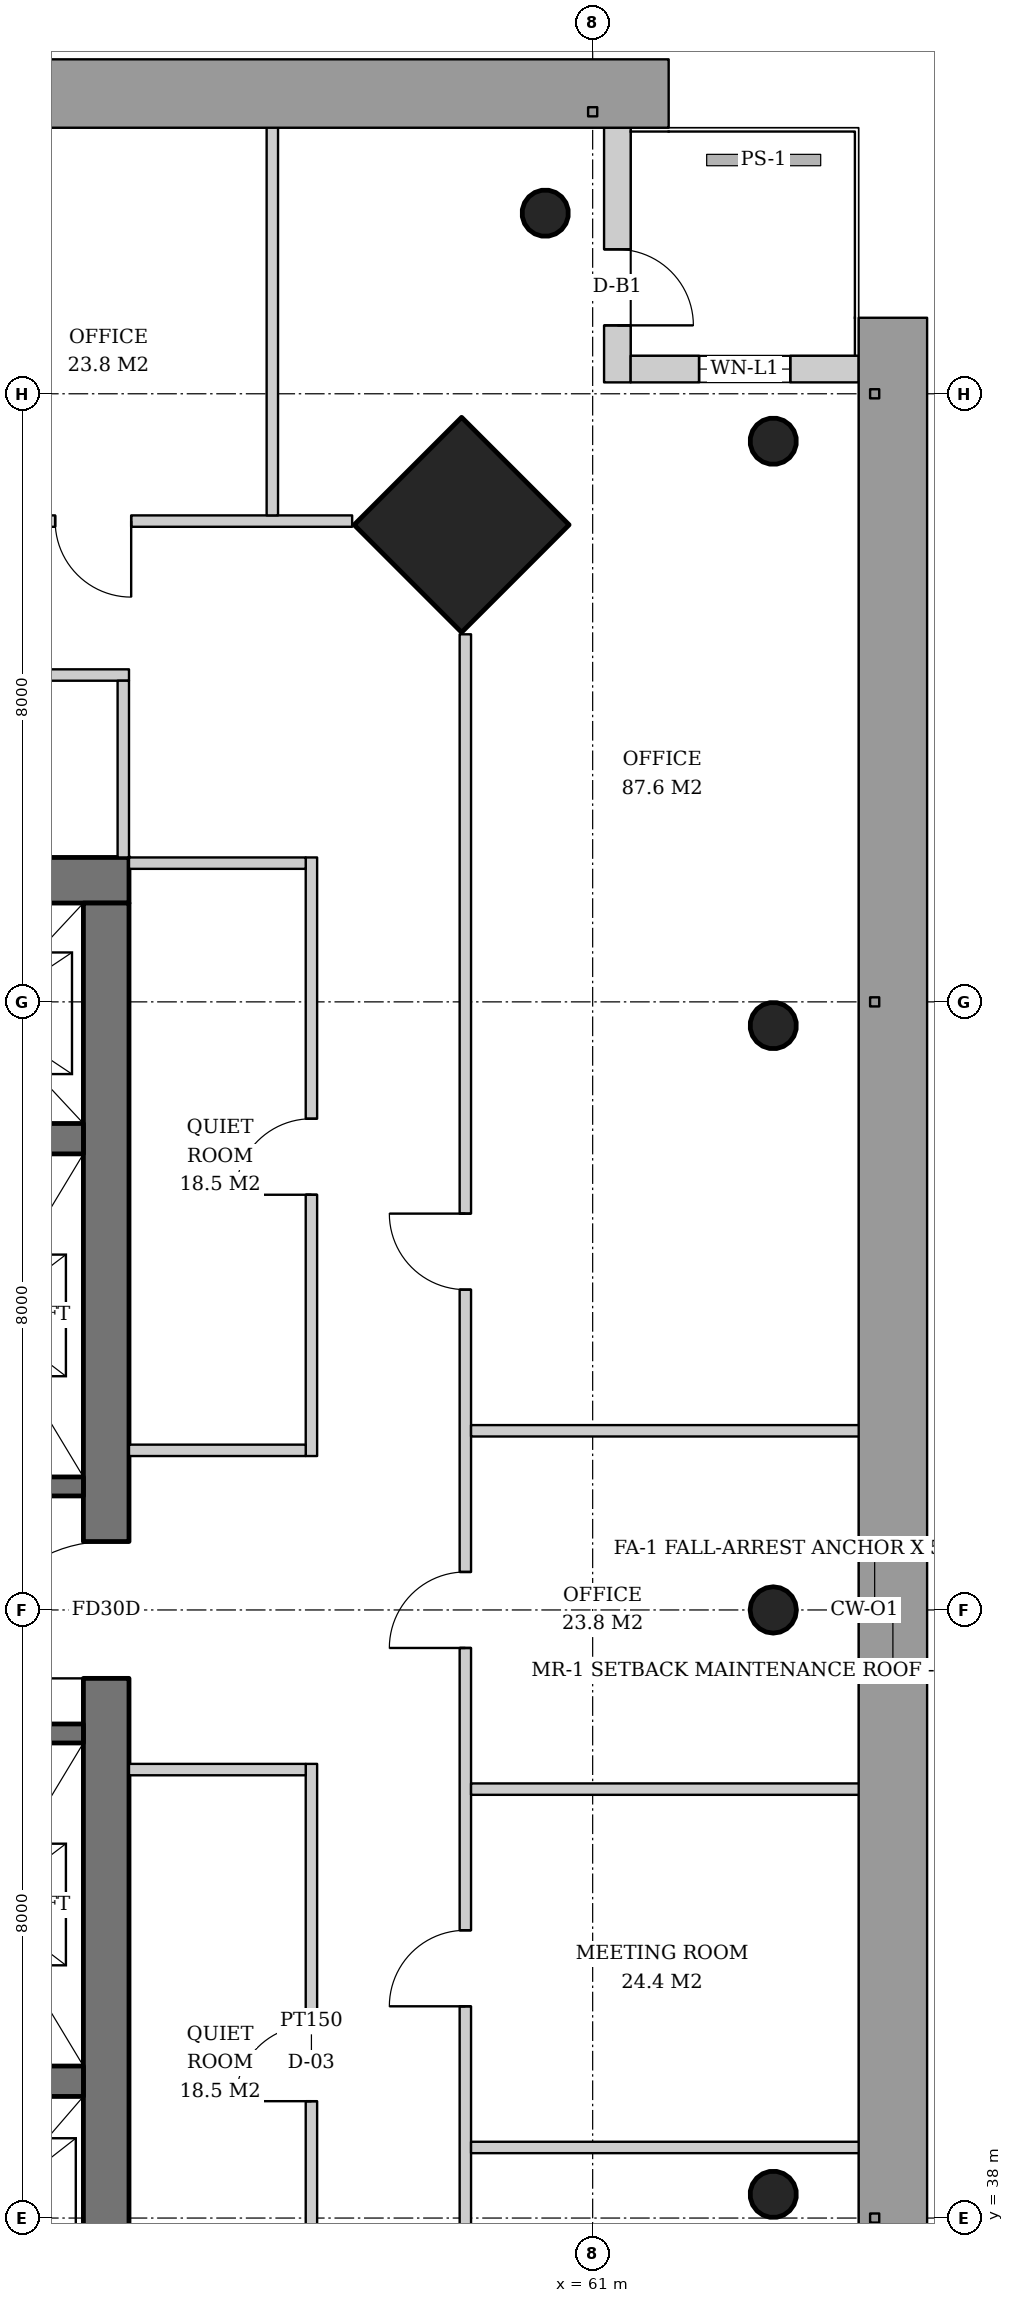
"""IFC4 building model, lengths in metres.
Left out: names, types, materials, properties, quantities, classifications, styles, units other than length and angle.
Written with IfcOpenShell. Run it as: python <this file> out.ifc"""

import sys

from ifc_helpers import new_model, si_unit, direction, frame, frame_2d, origin, origin_2d, place, context, subcontext, project, spatial, rectangle, hollow_circle, extrude, element, fill, save


model = new_model("IFC4")
c1 = context("Model", 3, precision=1e-05, world=origin(), true_north=direction((0.0, 1.0)))
c2 = subcontext(c1, "Body", "Model", "MODEL_VIEW")
j1 = project(units=[si_unit("LENGTHUNIT", "METRE"), si_unit("PLANEANGLEUNIT", "RADIAN")], contexts=[c1])
p1 = place(None, origin())
s1 = spatial("IfcSite", under=j1, at=p1, CompositionType="ELEMENT")
p2 = place(p1, origin())
s2 = spatial("IfcBuilding", under=s1, at=p2, CompositionType="ELEMENT")
p3 = place(p2, frame((0.0, 0.0, 195.8)))
s3 = spatial("IfcBuildingStorey", under=s2, at=p3, CompositionType="ELEMENT", Elevation=195.8)
p4 = place(p3, frame((59.314, 60.314, 0.0), z_axis=(-0.031898107953, -0.031898107953, 0.998981992539), x_axis=(0.707106781187, -0.707106781187, 0.0)))
e1 = element("IfcColumn", 1, at=p4, inside=s3, PredefinedType="COLUMN", context=c2, shape_type="SweptSolid", body=[
    extrude(rectangle(XDim=2.0, YDim=2.0, at=origin_2d()), origin(), (0.0, 0.0, 1.0), 3.804),
])
p5 = place(p3, frame((63.414, 61.414, 0.0), z_axis=(-0.031898107953, -0.031898107953, 0.998981992539), x_axis=(0.707106781187, -0.707106781187, 0.0)))
e2 = element("IfcColumn", 2, at=p5, inside=s3, PredefinedType="COLUMN", context=c2, shape_type="SweptSolid", body=[
    extrude(hollow_circle(Radius=0.305, WallThickness=0.025, at=origin_2d()), origin(), (0.0, 0.0, 1.0), 3.804),
])
p6 = place(p3, frame((63.414, 38.293, 0.0), z_axis=(-0.031910302246, 0.015923048203, 0.999363892257), x_axis=(-0.446493300058, -0.894786976326, 0.0)))
e3 = element("IfcColumn", 3, at=p6, inside=s3, PredefinedType="COLUMN", context=c2, shape_type="SweptSolid", body=[
    extrude(hollow_circle(Radius=0.305, WallThickness=0.025, at=origin_2d()), origin(), (0.0, 0.0, 1.0), 3.802),
])
p7 = place(p3, frame((63.414, 46.0, 0.0), z_axis=(-0.031914348339, 0.0, 0.999490607445), x_axis=(0.0, -1.0, 0.0)))
e4 = element("IfcColumn", 4, at=p7, inside=s3, PredefinedType="COLUMN", context=c2, shape_type="SweptSolid", body=[
    extrude(hollow_circle(Radius=0.305, WallThickness=0.025, at=origin_2d()), origin(), (0.0, 0.0, 1.0), 3.802),
])
p8 = place(p3, frame((63.414, 53.707, 0.0), z_axis=(-0.031910302246, -0.015923048203, 0.999363892257), x_axis=(0.446493300058, -0.894786976326, 0.0)))
e5 = element("IfcColumn", 5, at=p8, inside=s3, PredefinedType="COLUMN", context=c2, shape_type="SweptSolid", body=[
    extrude(hollow_circle(Radius=0.305, WallThickness=0.025, at=origin_2d()), origin(), (0.0, 0.0, 1.0), 3.802),
])
p9 = place(p3, frame((60.414, 64.414, 0.0), z_axis=(-0.031898107953, -0.031898107953, 0.998981992539), x_axis=(0.707106781187, -0.707106781187, 0.0)))
e6 = element("IfcColumn", 6, at=p9, inside=s3, PredefinedType="COLUMN", context=c2, shape_type="SweptSolid", body=[
    extrude(hollow_circle(Radius=0.305, WallThickness=0.025, at=origin_2d()), origin(), (0.0, 0.0, 1.0), 3.804),
])
p10 = place(p3, frame((35.1, 55.6, 0.0), z_axis=(0.0, 0.0, 1.0), x_axis=(1.0, 0.0, 0.0)))
e7 = element("IfcWall", 7, at=p10, inside=s3, PredefinedType="SHEAR", context=c2, shape_type="SweptSolid", body=[
    extrude(rectangle(XDim=19.8, YDim=0.6, at=frame_2d((9.9, 0.0))), origin(), (0.0, 0.0, 1.0), 3.8),
])
p11 = place(p10, frame((14.54, 0.0, 0.0)))
e8 = element("IfcOpeningElement", 8, at=p11, cuts=e7, PredefinedType="OPENING", context=c2, shape_type="SweptSolid", body=[
    extrude(rectangle(XDim=1.0, YDim=2.1, at=frame_2d((0.5, 1.05))), frame((0.0, 0.31, 0.0), z_axis=(0.0, -1.0, 0.0), x_axis=(1.0, 0.0, 0.0)), (0.0, 0.0, 1.0), 0.62),
])
p12 = place(p10, frame((0.85, 0.0, 0.0)))
e9 = element("IfcOpeningElement", 9, at=p12, cuts=e7, PredefinedType="OPENING", context=c2, shape_type="SweptSolid", body=[
    extrude(rectangle(XDim=1.0, YDim=2.1, at=frame_2d((0.5, 1.05))), frame((0.0, 0.31, 0.0), z_axis=(0.0, -1.0, 0.0), x_axis=(1.0, 0.0, 0.0)), (0.0, 0.0, 1.0), 0.62),
])
p13 = place(p10, frame((2.338, 0.0, 0.0)))
e10 = element("IfcOpeningElement", 10, at=p13, cuts=e7, PredefinedType="OPENING", context=c2, shape_type="SweptSolid", body=[
    extrude(rectangle(XDim=1.0, YDim=2.1, at=frame_2d((0.5, 1.05))), frame((0.0, 0.31, 0.0), z_axis=(0.0, -1.0, 0.0), x_axis=(1.0, 0.0, 0.0)), (0.0, 0.0, 1.0), 0.62),
])
p14 = place(p10, frame((3.913, 0.0, 0.0)))
e11 = element("IfcOpeningElement", 11, at=p14, cuts=e7, PredefinedType="OPENING", context=c2, shape_type="SweptSolid", body=[
    extrude(rectangle(XDim=1.0, YDim=2.1, at=frame_2d((0.5, 1.05))), frame((0.0, 0.31, 0.0), z_axis=(0.0, -1.0, 0.0), x_axis=(1.0, 0.0, 0.0)), (0.0, 0.0, 1.0), 0.62),
])
p15 = place(p3, frame((54.6, 36.7, 0.0), z_axis=(0.0, 0.0, 1.0), x_axis=(0.0, 1.0, 0.0)))
e12 = element("IfcWall", 12, at=p15, inside=s3, PredefinedType="SHEAR", context=c2, shape_type="SweptSolid", body=[
    extrude(rectangle(XDim=18.6, YDim=0.6, at=frame_2d((9.3, 0.0))), origin(), (0.0, 0.0, 1.0), 3.8),
])
p16 = place(p15, frame((8.4, 0.0, 0.0)))
e13 = element("IfcOpeningElement", 13, at=p16, cuts=e12, PredefinedType="OPENING", context=c2, shape_type="SweptSolid", body=[
    extrude(rectangle(XDim=1.8, YDim=2.4, at=frame_2d((0.9, 1.2))), frame((0.0, 0.31, 0.0), z_axis=(0.0, -1.0, 0.0), x_axis=(1.0, 0.0, 0.0)), (0.0, 0.0, 1.0), 0.62),
])
for number, where, z_axis, x_axis in (
    (14, (35.7, 39.8, 0.0), (0.0, 0.0, 1.0), (1.0, 0.0, 0.0)),
    (15, (35.7, 52.2, 0.0), (0.0, 0.0, 1.0), (1.0, 0.0, 0.0)),
):
    element("IfcWall", number, at=place(p3, frame(where, z_axis=z_axis, x_axis=x_axis)), inside=s3, PredefinedType="SHEAR", context=c2, shape_type="SweptSolid", body=[
        extrude(rectangle(XDim=18.6, YDim=0.4, at=frame_2d((9.3, 0.0))), origin(), (0.0, 0.0, 1.0), 3.8),
    ])
p17 = place(p3, frame((61.325, 65.5, 0.0), z_axis=(0.0, 0.0, 1.0), x_axis=(0.0, -1.0, 0.0)))
e16 = element("IfcWall", 16, at=p17, inside=s3, PredefinedType="SOLIDWALL", context=c2, shape_type="SweptSolid", body=[
    extrude(rectangle(XDim=3.35, YDim=0.35, at=frame_2d((1.675, 0.0))), origin(), (0.0, 0.0, 1.0), 3.62),
])
p18 = place(p17, frame((1.6, 0.0, 0.0)))
e17 = element("IfcOpeningElement", 17, at=p18, cuts=e16, PredefinedType="OPENING", context=c2, shape_type="SweptSolid", body=[
    extrude(rectangle(XDim=1.0, YDim=2.4, at=frame_2d((0.5, 1.2))), frame((0.0, 0.185, 0.0), z_axis=(0.0, -1.0, 0.0), x_axis=(1.0, 0.0, 0.0)), (0.0, 0.0, 1.0), 0.37),
])
p19 = place(p3, frame((61.5, 62.325, 0.0), z_axis=(0.0, 0.0, 1.0), x_axis=(1.0, 0.0, 0.0)))
e18 = element("IfcWall", 18, at=p19, inside=s3, PredefinedType="SOLIDWALL", context=c2, shape_type="SweptSolid", body=[
    extrude(rectangle(XDim=3.0, YDim=0.35, at=frame_2d((1.5, 0.0))), origin(), (0.0, 0.0, 1.0), 3.62),
])
p20 = place(p19, frame((0.9, 0.0, 0.6)))
e19 = element("IfcOpeningElement", 19, at=p20, cuts=e18, PredefinedType="OPENING", context=c2, shape_type="SweptSolid", body=[
    extrude(rectangle(XDim=1.2, YDim=2.55, at=frame_2d((0.6, 1.275))), frame((0.0, 0.185, 0.0), z_axis=(0.0, -1.0, 0.0), x_axis=(1.0, 0.0, 0.0)), (0.0, 0.0, 1.0), 0.37),
])
for number, where, z_axis, x_axis in (
    (20, (48.93, 47.625, 0.0), (0.0, 0.0, 1.0), (1.0, 0.0, 0.0)),
    (21, (48.93, 44.375, 0.0), (0.0, 0.0, 1.0), (1.0, 0.0, 0.0)),
):
    element("IfcWall", number, at=place(p3, frame(where, z_axis=z_axis, x_axis=x_axis)), inside=s3, PredefinedType="SHEAR", context=c2, shape_type="SweptSolid", body=[
        extrude(rectangle(XDim=5.37, YDim=0.25, at=frame_2d((2.685, 0.0))), origin(), (0.0, 0.0, 1.0), 3.8),
    ])
p21 = place(p3, frame((57.3, 36.1, 0.0), z_axis=(0.0, 0.0, 1.0), x_axis=(0.0, 1.0, 0.0)))
e22 = element("IfcWall", 22, at=p21, inside=s3, PredefinedType="PARTITIONING", context=c2, shape_type="SweptSolid", body=[
    extrude(rectangle(XDim=7.875, YDim=0.15, at=frame_2d((3.938, 0.0))), origin(), (0.0, 0.0, 1.0), 2.867),
])
p22 = place(p21, frame((3.438, 0.0, 0.0)))
e23 = element("IfcOpeningElement", 23, at=p22, cuts=e22, PredefinedType="OPENING", context=c2, shape_type="SweptSolid", body=[
    extrude(rectangle(XDim=1.0, YDim=2.1, at=frame_2d((0.5, 1.05))), frame((0.0, 0.085, 0.0), z_axis=(0.0, -1.0, 0.0), x_axis=(1.0, 0.0, 0.0)), (0.0, 0.0, 1.0), 0.17),
])
p23 = place(p3, frame((54.9, 43.9, 0.0), z_axis=(0.0, 0.0, 1.0), x_axis=(1.0, 0.0, 0.0)))
e24 = element("IfcWall", 24, at=p23, inside=s3, PredefinedType="PARTITIONING", context=c2, shape_type="SweptSolid", body=[
    extrude(rectangle(XDim=2.325, YDim=0.15, at=frame_2d((1.163, 0.0))), origin(), (0.0, 0.0, 1.0), 3.62),
])
p24 = place(p3, frame((57.3, 48.025, 0.0), z_axis=(0.0, 0.0, 1.0), x_axis=(0.0, 1.0, 0.0)))
e25 = element("IfcWall", 25, at=p24, inside=s3, PredefinedType="PARTITIONING", context=c2, shape_type="SweptSolid", body=[
    extrude(rectangle(XDim=7.875, YDim=0.15, at=frame_2d((3.938, 0.0))), origin(), (0.0, 0.0, 1.0), 2.867),
])
p25 = place(p24, frame((3.438, 0.0, 0.0)))
e26 = element("IfcOpeningElement", 26, at=p25, cuts=e25, PredefinedType="OPENING", context=c2, shape_type="SweptSolid", body=[
    extrude(rectangle(XDim=1.0, YDim=2.1, at=frame_2d((0.5, 1.05))), frame((0.0, 0.085, 0.0), z_axis=(0.0, -1.0, 0.0), x_axis=(1.0, 0.0, 0.0)), (0.0, 0.0, 1.0), 0.17),
])
for number, where, z_axis, x_axis in (
    (27, (54.9, 48.1, 0.0), (0.0, 0.0, 1.0), (1.0, 0.0, 0.0)),
    (28, (54.9, 55.825, 0.0), (0.0, 0.0, 1.0), (1.0, 0.0, 0.0)),
):
    element("IfcWall", number, at=place(p3, frame(where, z_axis=z_axis, x_axis=x_axis)), inside=s3, PredefinedType="PARTITIONING", context=c2, shape_type="SweptSolid", body=[
        extrude(rectangle(XDim=2.325, YDim=0.15, at=frame_2d((1.163, 0.0))), origin(), (0.0, 0.0, 1.0), 3.62),
    ])
p26 = place(p3, frame((54.9, 58.3, 0.0), z_axis=(0.0, 0.0, 1.0), x_axis=(-1.0, 0.0, 0.0)))
e29 = element("IfcWall", 29, at=p26, inside=s3, PredefinedType="PARTITIONING", context=c2, shape_type="SweptSolid", body=[
    extrude(rectangle(XDim=3.135, YDim=0.15, at=frame_2d((1.567, 0.0))), origin(), (0.0, 0.0, 1.0), 2.92),
])
p27 = place(p26, frame((1.067, 0.0, 0.0)))
e30 = element("IfcOpeningElement", 30, at=p27, cuts=e29, PredefinedType="OPENING", context=c2, shape_type="SweptSolid", body=[
    extrude(rectangle(XDim=1.0, YDim=2.1, at=frame_2d((0.5, 1.05))), frame((0.0, 0.085, 0.0), z_axis=(0.0, -1.0, 0.0), x_axis=(1.0, 0.0, 0.0)), (0.0, 0.0, 1.0), 0.17),
])
p28 = place(p3, frame((54.825, 55.9, 0.0), z_axis=(0.0, 0.0, 1.0), x_axis=(0.0, 1.0, 0.0)))
e31 = element("IfcWall", 31, at=p28, inside=s3, PredefinedType="PARTITIONING", context=c2, shape_type="SweptSolid", body=[
    extrude(rectangle(XDim=2.325, YDim=0.15, at=frame_2d((1.163, 0.0))), origin(), (0.0, 0.0, 1.0), 2.867),
])
p29 = place(p3, frame((59.325, 33.164, 0.0), z_axis=(0.0, 0.0, 1.0), x_axis=(0.0, 1.0, 0.0)))
e32 = element("IfcWall", 32, at=p29, inside=s3, PredefinedType="PARTITIONING", context=c2, shape_type="SweptSolid", body=[
    extrude(rectangle(XDim=25.671, YDim=0.15, at=frame_2d((12.836, 0.0))), origin(), (0.0, 0.0, 1.0), 2.867),
])
p30 = place(p29, frame((2.907, 0.0, 0.0)))
e33 = element("IfcOpeningElement", 33, at=p30, cuts=e32, PredefinedType="OPENING", context=c2, shape_type="SweptSolid", body=[
    extrude(rectangle(XDim=1.0, YDim=2.1, at=frame_2d((0.5, 1.05))), frame((0.0, 0.085, 0.0), z_axis=(0.0, -1.0, 0.0), x_axis=(1.0, 0.0, 0.0)), (0.0, 0.0, 1.0), 0.17),
])
p31 = place(p29, frame((7.622, 0.0, 0.0)))
e34 = element("IfcOpeningElement", 34, at=p31, cuts=e32, PredefinedType="OPENING", context=c2, shape_type="SweptSolid", body=[
    extrude(rectangle(XDim=1.0, YDim=2.1, at=frame_2d((0.5, 1.05))), frame((0.0, 0.085, 0.0), z_axis=(0.0, -1.0, 0.0), x_axis=(1.0, 0.0, 0.0)), (0.0, 0.0, 1.0), 0.17),
])
p32 = place(p29, frame((12.336, 0.0, 0.0)))
e35 = element("IfcOpeningElement", 35, at=p32, cuts=e32, PredefinedType="OPENING", context=c2, shape_type="SweptSolid", body=[
    extrude(rectangle(XDim=1.0, YDim=2.1, at=frame_2d((0.5, 1.05))), frame((0.0, 0.085, 0.0), z_axis=(0.0, -1.0, 0.0), x_axis=(1.0, 0.0, 0.0)), (0.0, 0.0, 1.0), 0.17),
])
p33 = place(p29, frame((17.05, 0.0, 0.0)))
e36 = element("IfcOpeningElement", 36, at=p33, cuts=e32, PredefinedType="OPENING", context=c2, shape_type="SweptSolid", body=[
    extrude(rectangle(XDim=1.0, YDim=2.1, at=frame_2d((0.5, 1.05))), frame((0.0, 0.085, 0.0), z_axis=(0.0, -1.0, 0.0), x_axis=(1.0, 0.0, 0.0)), (0.0, 0.0, 1.0), 0.17),
])
for number, where, z_axis, x_axis in (
    (37, (59.4, 38.928, 0.0), (0.0, 0.0, 1.0), (1.0, 0.0, 0.0)),
    (38, (59.4, 43.643, 0.0), (0.0, 0.0, 1.0), (1.0, 0.0, 0.0)),
):
    element("IfcWall", number, at=place(p3, frame(where, z_axis=z_axis, x_axis=x_axis)), inside=s3, PredefinedType="PARTITIONING", context=c2, shape_type="SweptSolid", body=[
        extrude(rectangle(XDim=5.14, YDim=0.15, at=frame_2d((2.57, 0.0))), origin(), (0.0, 0.0, 1.0), 3.12),
    ])
p34 = place(p3, frame((59.4, 48.357, 0.0), z_axis=(0.0, 0.0, 1.0), x_axis=(1.0, 0.0, 0.0)))
e39 = element("IfcWall", 39, at=p34, inside=s3, PredefinedType="PARTITIONING", context=c2, shape_type="SweptSolid", body=[
    extrude(rectangle(XDim=5.14, YDim=0.15, at=frame_2d((2.57, 0.0))), origin(), (0.0, 0.0, 1.0), 2.867),
])
p35 = place(p3, frame((57.836, 60.325, 0.0), z_axis=(0.0, 0.0, 1.0), x_axis=(-1.0, 0.0, 0.0)))
e40 = element("IfcWall", 40, at=p35, inside=s3, PredefinedType="PARTITIONING", context=c2, shape_type="SweptSolid", body=[
    extrude(rectangle(XDim=25.671, YDim=0.15, at=frame_2d((12.836, 0.0))), origin(), (0.0, 0.0, 1.0), 2.867),
])
p36 = place(p35, frame((2.907, 0.0, 0.0)))
e41 = element("IfcOpeningElement", 41, at=p36, cuts=e40, PredefinedType="OPENING", context=c2, shape_type="SweptSolid", body=[
    extrude(rectangle(XDim=1.0, YDim=2.1, at=frame_2d((0.5, 1.05))), frame((0.0, 0.085, 0.0), z_axis=(0.0, -1.0, 0.0), x_axis=(1.0, 0.0, 0.0)), (0.0, 0.0, 1.0), 0.17),
])
p37 = place(p35, frame((7.622, 0.0, 0.0)))
e42 = element("IfcOpeningElement", 42, at=p37, cuts=e40, PredefinedType="OPENING", context=c2, shape_type="SweptSolid", body=[
    extrude(rectangle(XDim=1.0, YDim=2.1, at=frame_2d((0.5, 1.05))), frame((0.0, 0.085, 0.0), z_axis=(0.0, -1.0, 0.0), x_axis=(1.0, 0.0, 0.0)), (0.0, 0.0, 1.0), 0.17),
])
p38 = place(p35, frame((12.336, 0.0, 0.0)))
e43 = element("IfcOpeningElement", 43, at=p38, cuts=e40, PredefinedType="OPENING", context=c2, shape_type="SweptSolid", body=[
    extrude(rectangle(XDim=1.0, YDim=2.1, at=frame_2d((0.5, 1.05))), frame((0.0, 0.085, 0.0), z_axis=(0.0, -1.0, 0.0), x_axis=(1.0, 0.0, 0.0)), (0.0, 0.0, 1.0), 0.17),
])
p39 = place(p35, frame((17.05, 0.0, 0.0)))
e44 = element("IfcOpeningElement", 44, at=p39, cuts=e40, PredefinedType="OPENING", context=c2, shape_type="SweptSolid", body=[
    extrude(rectangle(XDim=1.0, YDim=2.1, at=frame_2d((0.5, 1.05))), frame((0.0, 0.085, 0.0), z_axis=(0.0, -1.0, 0.0), x_axis=(1.0, 0.0, 0.0)), (0.0, 0.0, 1.0), 0.17),
])
p40 = place(p35, frame((21.764, 0.0, 0.0)))
e45 = element("IfcOpeningElement", 45, at=p40, cuts=e40, PredefinedType="OPENING", context=c2, shape_type="SweptSolid", body=[
    extrude(rectangle(XDim=1.0, YDim=2.1, at=frame_2d((0.5, 1.05))), frame((0.0, 0.085, 0.0), z_axis=(0.0, -1.0, 0.0), x_axis=(1.0, 0.0, 0.0)), (0.0, 0.0, 1.0), 0.17),
])
p41 = place(p3, frame((56.786, 60.4, 0.0), z_axis=(0.0, 0.0, 1.0), x_axis=(0.0, 1.0, 0.0)))
e46 = element("IfcWall", 46, at=p41, inside=s3, PredefinedType="PARTITIONING", context=c2, shape_type="SweptSolid", body=[
    extrude(rectangle(XDim=5.14, YDim=0.15, at=frame_2d((2.57, 0.0))), origin(), (0.0, 0.0, 1.0), 3.12),
])
p42 = place(p18, origin())
e47 = element("IfcDoor", 47, at=p42, inside=s3, OperationType="SINGLE_SWING_RIGHT", PredefinedType="DOOR", context=c2, shape_type="SweptSolid", body=[
    extrude(rectangle(XDim=1.0, YDim=2.4, at=frame_2d((0.5, 1.2))), frame((0.0, 0.025, 0.0), z_axis=(0.0, -1.0, 0.0), x_axis=(1.0, 0.0, 0.0)), (0.0, 0.0, 1.0), 0.05),
])
fill(e17, e47)
p43 = place(p20, origin())
e48 = element("IfcWindow", 48, at=p43, inside=s3, PartitioningType="SINGLE_PANEL", PredefinedType="WINDOW", context=c2, shape_type="SweptSolid", body=[
    extrude(rectangle(XDim=1.2, YDim=2.55, at=frame_2d((0.6, 1.275))), frame((0.0, 0.03, 0.0), z_axis=(0.0, -1.0, 0.0), x_axis=(1.0, 0.0, 0.0)), (0.0, 0.0, 1.0), 0.06),
])
fill(e19, e48)
p44 = place(p16, origin())
e49 = element("IfcDoor", 49, at=p44, inside=s3, OperationType="DOUBLE_DOOR_SINGLE_SWING", PredefinedType="DOOR", context=c2, shape_type="SweptSolid", body=[
    extrude(rectangle(XDim=1.8, YDim=2.4, at=frame_2d((0.9, 1.2))), frame((0.0, 0.025, 0.0), z_axis=(0.0, -1.0, 0.0), x_axis=(1.0, 0.0, 0.0)), (0.0, 0.0, 1.0), 0.05),
])
fill(e13, e49)
p45 = place(p22, origin())
e50 = element("IfcDoor", 50, at=p45, inside=s3, OperationType="SINGLE_SWING_LEFT", PredefinedType="DOOR", context=c2, shape_type="SweptSolid", body=[
    extrude(rectangle(XDim=1.0, YDim=2.1, at=frame_2d((0.5, 1.05))), frame((0.0, 0.025, 0.0), z_axis=(0.0, -1.0, 0.0), x_axis=(1.0, 0.0, 0.0)), (0.0, 0.0, 1.0), 0.05),
])
fill(e23, e50)
p46 = place(p25, origin())
e51 = element("IfcDoor", 51, at=p46, inside=s3, OperationType="SINGLE_SWING_LEFT", PredefinedType="DOOR", context=c2, shape_type="SweptSolid", body=[
    extrude(rectangle(XDim=1.0, YDim=2.1, at=frame_2d((0.5, 1.05))), frame((0.0, 0.025, 0.0), z_axis=(0.0, -1.0, 0.0), x_axis=(1.0, 0.0, 0.0)), (0.0, 0.0, 1.0), 0.05),
])
fill(e26, e51)
p47 = place(p31, origin())
e52 = element("IfcDoor", 52, at=p47, inside=s3, OperationType="SINGLE_SWING_LEFT", PredefinedType="DOOR", context=c2, shape_type="SweptSolid", body=[
    extrude(rectangle(XDim=1.0, YDim=2.1, at=frame_2d((0.5, 1.05))), frame((0.0, 0.025, 0.0), z_axis=(0.0, -1.0, 0.0), x_axis=(1.0, 0.0, 0.0)), (0.0, 0.0, 1.0), 0.05),
])
fill(e34, e52)
p48 = place(p32, origin())
e53 = element("IfcDoor", 53, at=p48, inside=s3, OperationType="SINGLE_SWING_LEFT", PredefinedType="DOOR", context=c2, shape_type="SweptSolid", body=[
    extrude(rectangle(XDim=1.0, YDim=2.1, at=frame_2d((0.5, 1.05))), frame((0.0, 0.025, 0.0), z_axis=(0.0, -1.0, 0.0), x_axis=(1.0, 0.0, 0.0)), (0.0, 0.0, 1.0), 0.05),
])
fill(e35, e53)
p49 = place(p33, origin())
e54 = element("IfcDoor", 54, at=p49, inside=s3, OperationType="SINGLE_SWING_RIGHT", PredefinedType="DOOR", context=c2, shape_type="SweptSolid", body=[
    extrude(rectangle(XDim=1.0, YDim=2.1, at=frame_2d((0.5, 1.05))), frame((0.0, 0.025, 0.0), z_axis=(0.0, -1.0, 0.0), x_axis=(1.0, 0.0, 0.0)), (0.0, 0.0, 1.0), 0.05),
])
fill(e36, e54)
p50 = place(p36, origin())
e55 = element("IfcDoor", 55, at=p50, inside=s3, OperationType="SINGLE_SWING_LEFT", PredefinedType="DOOR", context=c2, shape_type="SweptSolid", body=[
    extrude(rectangle(XDim=1.0, YDim=2.1, at=frame_2d((0.5, 1.05))), frame((0.0, 0.025, 0.0), z_axis=(0.0, -1.0, 0.0), x_axis=(1.0, 0.0, 0.0)), (0.0, 0.0, 1.0), 0.05),
])
fill(e41, e55)
save(model, sys.argv[1])
